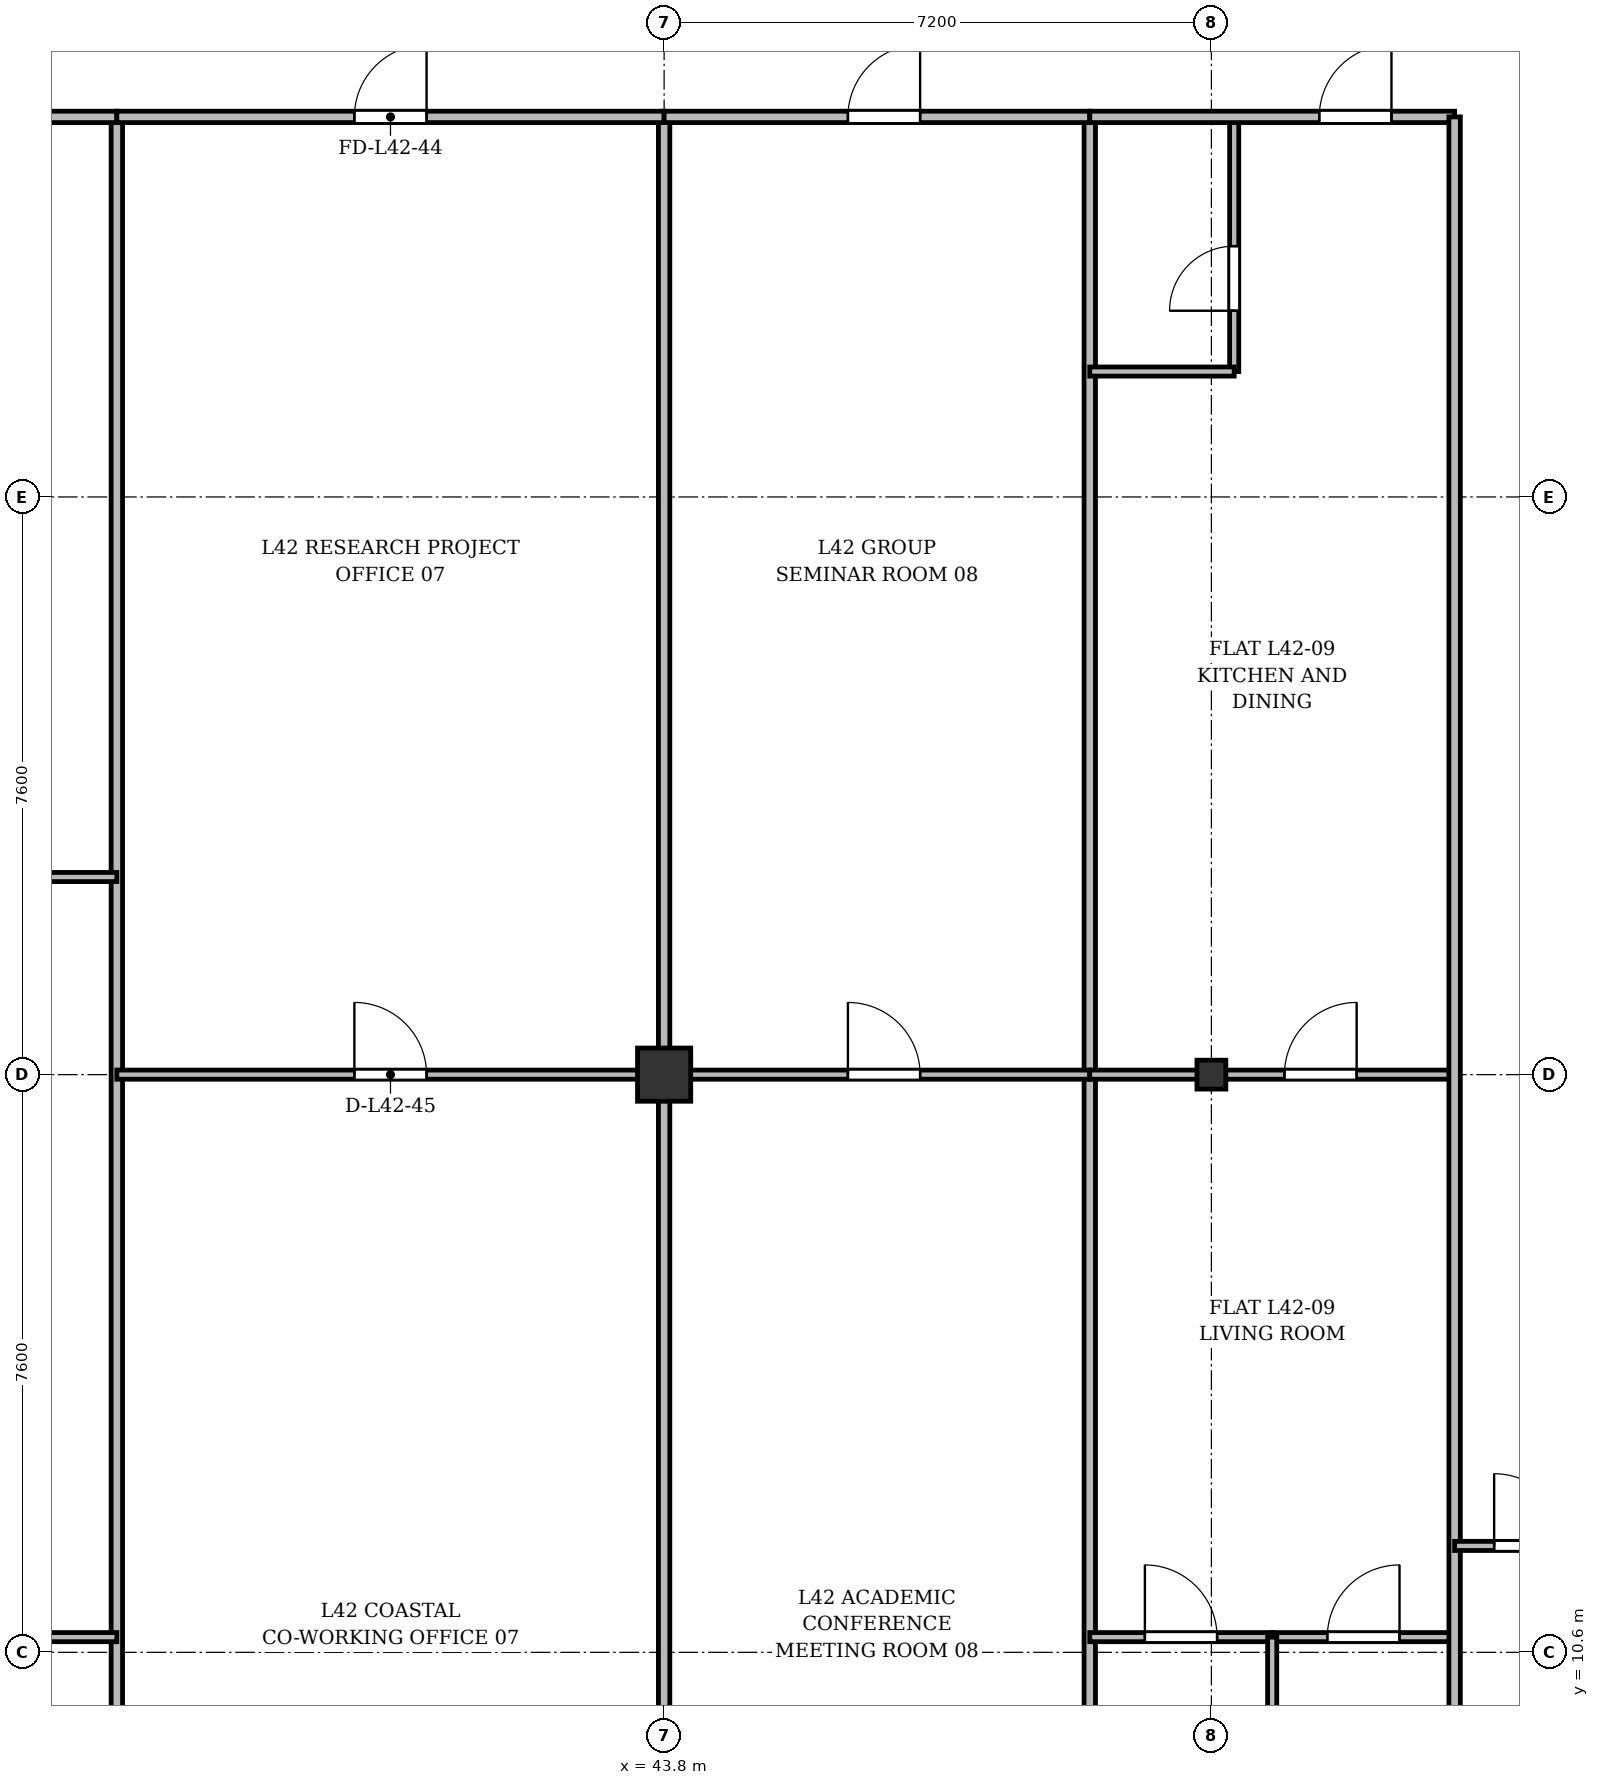
"""IFC4 building model, lengths in metres.
Left out: names, types, materials, properties, quantities, classifications, styles, units other than length and angle.
Written with IfcOpenShell. Run it as: python <this file> out.ifc"""

import sys

from ifc_helpers import new_model, si_unit, direction, frame, frame_2d, origin, origin_2d, place, context, subcontext, project, spatial, rectangle, i_section, extrude, source, transform, mapped, element, fill, save


model = new_model("IFC4")
c1 = context("Model", 3, precision=1e-05, world=origin(), true_north=direction((0.0, 1.0)))
c2 = subcontext(c1, "Body", "Model", "MODEL_VIEW")
j1 = project(units=[si_unit("LENGTHUNIT", "METRE"), si_unit("PLANEANGLEUNIT", "RADIAN")], contexts=[c1])
p1 = place(None, origin())
s1 = spatial("IfcSite", under=j1, at=p1, CompositionType="ELEMENT")
p2 = place(p1, origin())
s2 = spatial("IfcBuilding", under=s1, at=p2, CompositionType="ELEMENT")
p3 = place(p2, frame((0.0, 0.0, 160.9)))
s3 = spatial("IfcBuildingStorey", under=s2, at=p3, CompositionType="ELEMENT", Elevation=160.9)
m1 = source(origin(), c2, "Body", "SweptSolid", [
    extrude(rectangle(XDim=0.7, YDim=0.7, at=origin_2d()), origin(), (0.0, 0.0, 1.0), 3.6),
])
p4 = place(p3, frame((43.8, 18.2, 0.0), z_axis=(0.0, 0.0, 1.0), x_axis=(1.0, 0.0, 0.0)))
e1 = element("IfcColumn", 1, at=p4, inside=s3, PredefinedType="COLUMN", context=c2, shape_type="MappedRepresentation", body=[
    mapped(m1, transform((0.0, 0.0, 0.0), x_axis=(1.0, 0.0, 0.0), y_axis=(0.0, 1.0, 0.0), z_axis=(0.0, 0.0, 1.0), scale=1.0)),
])
m2 = source(origin(), c2, "Body", "SweptSolid", [
    extrude(i_section(OverallWidth=0.38, OverallDepth=0.38, WebThickness=0.02, FlangeThickness=0.03, at=origin_2d()), origin(), (0.0, 0.0, 1.0), 3.6),
])
p5 = place(p3, frame((51.0, 18.2, 0.0), z_axis=(0.0, 0.0, 1.0), x_axis=(1.0, 0.0, 0.0)))
e2 = element("IfcColumn", 2, at=p5, inside=s3, PredefinedType="COLUMN", context=c2, shape_type="MappedRepresentation", body=[
    mapped(m2, transform((0.0, 0.0, 0.0), x_axis=(1.0, 0.0, 0.0), y_axis=(0.0, 1.0, 0.0), z_axis=(0.0, 0.0, 1.0), scale=1.0)),
])
p6 = place(p3, frame((36.6, 3.525, 0.0), z_axis=(0.0, 0.0, 1.0), x_axis=(0.0, 1.0, 0.0)))
e3 = element("IfcWall", 3, at=p6, inside=s3, PredefinedType="PARTITIONING", context=c2, shape_type="SweptSolid", body=[
    extrude(rectangle(XDim=27.275, YDim=0.15, at=frame_2d((13.638, 0.0))), origin(), (0.0, 0.0, 1.0), 2.75),
])
p7 = place(p3, frame((43.8, 3.525, 0.0), z_axis=(0.0, 0.0, 1.0), x_axis=(0.0, 1.0, 0.0)))
e4 = element("IfcWall", 4, at=p7, inside=s3, PredefinedType="PARTITIONING", context=c2, shape_type="SweptSolid", body=[
    extrude(rectangle(XDim=27.275, YDim=0.15, at=frame_2d((13.638, 0.0))), origin(), (0.0, 0.0, 1.0), 2.85),
])
p8 = place(p3, frame((49.4, 3.525, 0.0), z_axis=(0.0, 0.0, 1.0), x_axis=(0.0, 1.0, 0.0)))
e5 = element("IfcWall", 5, at=p8, inside=s3, PredefinedType="PARTITIONING", context=c2, shape_type="SweptSolid", body=[
    extrude(rectangle(XDim=27.275, YDim=0.15, at=frame_2d((13.638, 0.0))), origin(), (0.0, 0.0, 1.0), 2.75),
])
p9 = place(p3, frame((30.6, 20.8, 0.0), z_axis=(0.0, 0.0, 1.0), x_axis=(1.0, 0.0, 0.0)))
e6 = element("IfcWall", 6, at=p9, inside=s3, PredefinedType="PARTITIONING", context=c2, shape_type="SweptSolid", body=[
    extrude(rectangle(XDim=6.0, YDim=0.12, at=frame_2d((3.0, 0.0))), origin(), (0.0, 0.0, 1.0), 2.85),
])
p10 = place(p9, frame((2.432, 0.0, 0.0)))
e7 = element("IfcOpeningElement", 7, at=p10, cuts=e6, PredefinedType="OPENING", context=c2, shape_type="SweptSolid", body=[
    extrude(rectangle(XDim=0.95, YDim=2.15, at=frame_2d((0.475, 1.075))), frame((0.0, 0.07, 0.0), z_axis=(0.0, -1.0, 0.0), x_axis=(1.0, 0.0, 0.0)), (0.0, 0.0, 1.0), 0.14),
])
p11 = place(p3, frame((30.6, 30.8, 0.0), z_axis=(0.0, 0.0, 1.0), x_axis=(1.0, 0.0, 0.0)))
e8 = element("IfcWall", 8, at=p11, inside=s3, PredefinedType="PARTITIONING", context=c2, shape_type="SweptSolid", body=[
    extrude(rectangle(XDim=6.0, YDim=0.15, at=frame_2d((3.0, 0.0))), origin(), (0.0, 0.0, 1.0), 2.85),
])
p12 = place(p11, frame((3.865, 0.0, 0.0)))
e9 = element("IfcOpeningElement", 9, at=p12, cuts=e8, PredefinedType="OPENING", context=c2, shape_type="SweptSolid", body=[
    extrude(rectangle(XDim=0.95, YDim=2.15, at=frame_2d((0.475, 1.075))), frame((0.0, 0.085, 0.0), z_axis=(0.0, -1.0, 0.0), x_axis=(1.0, 0.0, 0.0)), (0.0, 0.0, 1.0), 0.17),
])
p13 = place(p3, frame((33.6, 10.8, 0.0), z_axis=(0.0, 0.0, 1.0), x_axis=(1.0, 0.0, 0.0)))
e10 = element("IfcWall", 10, at=p13, inside=s3, PredefinedType="PARTITIONING", context=c2, shape_type="SweptSolid", body=[
    extrude(rectangle(XDim=3.0, YDim=0.12, at=frame_2d((1.5, 0.0))), origin(), (0.0, 0.0, 1.0), 3.35),
])
p14 = place(p13, frame((1.025, 0.0, 0.0)))
e11 = element("IfcOpeningElement", 11, at=p14, cuts=e10, PredefinedType="OPENING", context=c2, shape_type="SweptSolid", body=[
    extrude(rectangle(XDim=0.95, YDim=2.15, at=frame_2d((0.475, 1.075))), frame((0.0, 0.07, 0.0), z_axis=(0.0, -1.0, 0.0), x_axis=(1.0, 0.0, 0.0)), (0.0, 0.0, 1.0), 0.14),
])
p15 = place(p3, frame((36.6, 30.8, 0.0), z_axis=(0.0, 0.0, 1.0), x_axis=(1.0, 0.0, 0.0)))
e12 = element("IfcWall", 12, at=p15, inside=s3, PredefinedType="PARTITIONING", context=c2, shape_type="SweptSolid", body=[
    extrude(rectangle(XDim=7.2, YDim=0.15, at=frame_2d((3.6, 0.0))), origin(), (0.0, 0.0, 1.0), 2.85),
])
p16 = place(p15, frame((3.125, 0.0, 0.0)))
e13 = element("IfcOpeningElement", 13, at=p16, cuts=e12, PredefinedType="OPENING", context=c2, shape_type="SweptSolid", body=[
    extrude(rectangle(XDim=0.95, YDim=2.15, at=frame_2d((0.475, 1.075))), frame((0.0, 0.085, 0.0), z_axis=(0.0, -1.0, 0.0), x_axis=(1.0, 0.0, 0.0)), (0.0, 0.0, 1.0), 0.17),
])
p17 = place(p3, frame((36.6, 18.2, 0.0), z_axis=(0.0, 0.0, 1.0), x_axis=(1.0, 0.0, 0.0)))
e14 = element("IfcWall", 14, at=p17, inside=s3, PredefinedType="PARTITIONING", context=c2, shape_type="SweptSolid", body=[
    extrude(rectangle(XDim=7.2, YDim=0.12, at=frame_2d((3.6, 0.0))), origin(), (0.0, 0.0, 1.0), 2.75),
])
p18 = place(p17, frame((3.125, 0.0, 0.0)))
e15 = element("IfcOpeningElement", 15, at=p18, cuts=e14, PredefinedType="OPENING", context=c2, shape_type="SweptSolid", body=[
    extrude(rectangle(XDim=0.95, YDim=2.15, at=frame_2d((0.475, 1.075))), frame((0.0, 0.07, 0.0), z_axis=(0.0, -1.0, 0.0), x_axis=(1.0, 0.0, 0.0)), (0.0, 0.0, 1.0), 0.14),
])
p19 = place(p3, frame((43.8, 30.8, 0.0), z_axis=(0.0, 0.0, 1.0), x_axis=(1.0, 0.0, 0.0)))
e16 = element("IfcWall", 16, at=p19, inside=s3, PredefinedType="PARTITIONING", context=c2, shape_type="SweptSolid", body=[
    extrude(rectangle(XDim=5.6, YDim=0.15, at=frame_2d((2.8, 0.0))), origin(), (0.0, 0.0, 1.0), 2.85),
])
p20 = place(p19, frame((2.418, 0.0, 0.0)))
e17 = element("IfcOpeningElement", 17, at=p20, cuts=e16, PredefinedType="OPENING", context=c2, shape_type="SweptSolid", body=[
    extrude(rectangle(XDim=0.95, YDim=2.15, at=frame_2d((0.475, 1.075))), frame((0.0, 0.085, 0.0), z_axis=(0.0, -1.0, 0.0), x_axis=(1.0, 0.0, 0.0)), (0.0, 0.0, 1.0), 0.17),
])
p21 = place(p3, frame((43.8, 18.2, 0.0), z_axis=(0.0, 0.0, 1.0), x_axis=(1.0, 0.0, 0.0)))
e18 = element("IfcWall", 18, at=p21, inside=s3, PredefinedType="PARTITIONING", context=c2, shape_type="SweptSolid", body=[
    extrude(rectangle(XDim=5.6, YDim=0.12, at=frame_2d((2.8, 0.0))), origin(), (0.0, 0.0, 1.0), 2.75),
])
p22 = place(p21, frame((2.418, 0.0, 0.0)))
e19 = element("IfcOpeningElement", 19, at=p22, cuts=e18, PredefinedType="OPENING", context=c2, shape_type="SweptSolid", body=[
    extrude(rectangle(XDim=0.95, YDim=2.15, at=frame_2d((0.475, 1.075))), frame((0.0, 0.07, 0.0), z_axis=(0.0, -1.0, 0.0), x_axis=(1.0, 0.0, 0.0)), (0.0, 0.0, 1.0), 0.14),
])
p23 = place(p3, frame((49.4, 18.2, 0.0), z_axis=(0.0, 0.0, 1.0), x_axis=(1.0, 0.0, 0.0)))
e20 = element("IfcWall", 20, at=p23, inside=s3, PredefinedType="PARTITIONING", context=c2, shape_type="SweptSolid", body=[
    extrude(rectangle(XDim=4.8, YDim=0.12, at=frame_2d((2.4, 0.0))), origin(), (0.0, 0.0, 1.0), 2.75),
])
p24 = place(p23, frame((2.561, 0.0, 0.0)))
e21 = element("IfcOpeningElement", 21, at=p24, cuts=e20, PredefinedType="OPENING", context=c2, shape_type="SweptSolid", body=[
    extrude(rectangle(XDim=0.95, YDim=2.15, at=frame_2d((0.475, 1.075))), frame((0.0, 0.07, 0.0), z_axis=(0.0, -1.0, 0.0), x_axis=(1.0, 0.0, 0.0)), (0.0, 0.0, 1.0), 0.14),
])
p25 = place(p3, frame((51.3, 27.45, 0.0), z_axis=(0.0, 0.0, 1.0), x_axis=(0.0, 1.0, 0.0)))
e22 = element("IfcWall", 22, at=p25, inside=s3, PredefinedType="PARTITIONING", context=c2, shape_type="SweptSolid", body=[
    extrude(rectangle(XDim=3.35, YDim=0.12, at=frame_2d((1.675, 0.0))), origin(), (0.0, 0.0, 1.0), 3.35),
])
p26 = place(p25, frame((0.8, 0.0, 0.0)))
e23 = element("IfcOpeningElement", 23, at=p26, cuts=e22, PredefinedType="OPENING", context=c2, shape_type="SweptSolid", body=[
    extrude(rectangle(XDim=0.85, YDim=2.1, at=frame_2d((0.425, 1.05))), frame((0.0, 0.07, 0.0), z_axis=(0.0, -1.0, 0.0), x_axis=(1.0, 0.0, 0.0)), (0.0, 0.0, 1.0), 0.14),
])
p27 = place(p3, frame((49.4, 27.45, 0.0), z_axis=(0.0, 0.0, 1.0), x_axis=(1.0, 0.0, 0.0)))
e24 = element("IfcWall", 24, at=p27, inside=s3, PredefinedType="PARTITIONING", context=c2, shape_type="SweptSolid", body=[
    extrude(rectangle(XDim=1.9, YDim=0.12, at=frame_2d((0.95, 0.0))), origin(), (0.0, 0.0, 1.0), 2.85),
])
p28 = place(p3, frame((49.4, 30.8, 0.0), z_axis=(0.0, 0.0, 1.0), x_axis=(1.0, 0.0, 0.0)))
e25 = element("IfcWall", 25, at=p28, inside=s3, PredefinedType="PARTITIONING", context=c2, shape_type="SweptSolid", body=[
    extrude(rectangle(XDim=4.8, YDim=0.15, at=frame_2d((2.4, 0.0))), origin(), (0.0, 0.0, 1.0), 2.85),
])
p29 = place(p28, frame((3.019, 0.0, 0.0)))
e26 = element("IfcOpeningElement", 26, at=p29, cuts=e25, PredefinedType="OPENING", context=c2, shape_type="SweptSolid", body=[
    extrude(rectangle(XDim=0.95, YDim=2.15, at=frame_2d((0.475, 1.075))), frame((0.0, 0.085, 0.0), z_axis=(0.0, -1.0, 0.0), x_axis=(1.0, 0.0, 0.0)), (0.0, 0.0, 1.0), 0.17),
])
p30 = place(p3, frame((49.4, 10.8, 0.0), z_axis=(0.0, 0.0, 1.0), x_axis=(1.0, 0.0, 0.0)))
e27 = element("IfcWall", 27, at=p30, inside=s3, PredefinedType="PARTITIONING", context=c2, shape_type="SweptSolid", body=[
    extrude(rectangle(XDim=2.4, YDim=0.12, at=frame_2d((1.2, 0.0))), origin(), (0.0, 0.0, 1.0), 2.85),
])
p31 = place(p30, frame((0.725, 0.0, 0.0)))
e28 = element("IfcOpeningElement", 28, at=p31, cuts=e27, PredefinedType="OPENING", context=c2, shape_type="SweptSolid", body=[
    extrude(rectangle(XDim=0.95, YDim=2.15, at=frame_2d((0.475, 1.075))), frame((0.0, 0.07, 0.0), z_axis=(0.0, -1.0, 0.0), x_axis=(1.0, 0.0, 0.0)), (0.0, 0.0, 1.0), 0.14),
])
p32 = place(p3, frame((51.8, 10.8, 0.0), z_axis=(0.0, 0.0, 1.0), x_axis=(1.0, 0.0, 0.0)))
e29 = element("IfcWall", 29, at=p32, inside=s3, PredefinedType="PARTITIONING", context=c2, shape_type="SweptSolid", body=[
    extrude(rectangle(XDim=2.4, YDim=0.12, at=frame_2d((1.2, 0.0))), origin(), (0.0, 0.0, 1.0), 3.35),
])
p33 = place(p32, frame((0.725, 0.0, 0.0)))
e30 = element("IfcOpeningElement", 30, at=p33, cuts=e29, PredefinedType="OPENING", context=c2, shape_type="SweptSolid", body=[
    extrude(rectangle(XDim=0.95, YDim=2.15, at=frame_2d((0.475, 1.075))), frame((0.0, 0.07, 0.0), z_axis=(0.0, -1.0, 0.0), x_axis=(1.0, 0.0, 0.0)), (0.0, 0.0, 1.0), 0.14),
])
p34 = place(p3, frame((51.8, 3.525, 0.0), z_axis=(0.0, 0.0, 1.0), x_axis=(0.0, 1.0, 0.0)))
e31 = element("IfcWall", 31, at=p34, inside=s3, PredefinedType="PARTITIONING", context=c2, shape_type="SweptSolid", body=[
    extrude(rectangle(XDim=7.275, YDim=0.12, at=frame_2d((3.638, 0.0))), origin(), (0.0, 0.0, 1.0), 2.75),
])
p35 = place(p3, frame((54.2, 3.525, 0.0), z_axis=(0.0, 0.0, 1.0), x_axis=(0.0, 1.0, 0.0)))
e32 = element("IfcWall", 32, at=p35, inside=s3, PredefinedType="PARTITIONING", context=c2, shape_type="SweptSolid", body=[
    extrude(rectangle(XDim=27.275, YDim=0.15, at=frame_2d((13.638, 0.0))), origin(), (0.0, 0.0, 1.0), 2.75),
])
p36 = place(p3, frame((54.2, 12.0, 0.0), z_axis=(0.0, 0.0, 1.0), x_axis=(1.0, 0.0, 0.0)))
e33 = element("IfcWall", 33, at=p36, inside=s3, PredefinedType="PARTITIONING", context=c2, shape_type="SweptSolid", body=[
    extrude(rectangle(XDim=2.0, YDim=0.12, at=frame_2d((1.0, 0.0))), origin(), (0.0, 0.0, 1.0), 3.35),
])
p37 = place(p36, frame((0.52, 0.0, 0.0)))
e34 = element("IfcOpeningElement", 34, at=p37, cuts=e33, PredefinedType="OPENING", context=c2, shape_type="SweptSolid", body=[
    extrude(rectangle(XDim=0.95, YDim=2.15, at=frame_2d((0.475, 1.075))), frame((0.0, 0.07, 0.0), z_axis=(0.0, -1.0, 0.0), x_axis=(1.0, 0.0, 0.0)), (0.0, 0.0, 1.0), 0.14),
])
m3 = source(origin(), c2, "Body", "SweptSolid", [
    extrude(rectangle(XDim=0.95, YDim=2.15, at=frame_2d((0.475, 1.075))), frame((0.0, 0.025, 0.0), z_axis=(0.0, -1.0, 0.0), x_axis=(1.0, 0.0, 0.0)), (0.0, 0.0, 1.0), 0.05),
])
p38 = place(p16, origin())
e35 = element("IfcDoor", 35, at=p38, inside=s3, OperationType="SINGLE_SWING_RIGHT", PredefinedType="DOOR", context=c2, shape_type="MappedRepresentation", body=[
    mapped(m3, transform((0.0, 0.0, 0.0), x_axis=(1.0, 0.0, 0.0), y_axis=(0.0, 1.0, 0.0), z_axis=(0.0, 0.0, 1.0), scale=1.0)),
])
fill(e13, e35)
p39 = place(p18, origin())
e36 = element("IfcDoor", 36, at=p39, inside=s3, OperationType="SINGLE_SWING_LEFT", PredefinedType="DOOR", context=c2, shape_type="MappedRepresentation", body=[
    mapped(m3, transform((0.0, 0.0, 0.0), x_axis=(1.0, 0.0, 0.0), y_axis=(0.0, 1.0, 0.0), z_axis=(0.0, 0.0, 1.0), scale=1.0)),
])
fill(e15, e36)
p40 = place(p20, origin())
e37 = element("IfcDoor", 37, at=p40, inside=s3, OperationType="SINGLE_SWING_RIGHT", PredefinedType="DOOR", context=c2, shape_type="MappedRepresentation", body=[
    mapped(m3, transform((0.0, 0.0, 0.0), x_axis=(1.0, 0.0, 0.0), y_axis=(0.0, 1.0, 0.0), z_axis=(0.0, 0.0, 1.0), scale=1.0)),
])
fill(e17, e37)
p41 = place(p22, origin())
e38 = element("IfcDoor", 38, at=p41, inside=s3, OperationType="SINGLE_SWING_LEFT", PredefinedType="DOOR", context=c2, shape_type="MappedRepresentation", body=[
    mapped(m3, transform((0.0, 0.0, 0.0), x_axis=(1.0, 0.0, 0.0), y_axis=(0.0, 1.0, 0.0), z_axis=(0.0, 0.0, 1.0), scale=1.0)),
])
fill(e19, e38)
p42 = place(p24, origin())
e39 = element("IfcDoor", 39, at=p42, inside=s3, OperationType="SINGLE_SWING_RIGHT", PredefinedType="DOOR", context=c2, shape_type="MappedRepresentation", body=[
    mapped(m3, transform((0.0, 0.0, 0.0), x_axis=(1.0, 0.0, 0.0), y_axis=(0.0, 1.0, 0.0), z_axis=(0.0, 0.0, 1.0), scale=1.0)),
])
fill(e21, e39)
m4 = source(origin(), c2, "Body", "SweptSolid", [
    extrude(rectangle(XDim=0.85, YDim=2.1, at=frame_2d((0.425, 1.05))), frame((0.0, 0.025, 0.0), z_axis=(0.0, -1.0, 0.0), x_axis=(1.0, 0.0, 0.0)), (0.0, 0.0, 1.0), 0.05),
])
p43 = place(p26, origin())
e40 = element("IfcDoor", 40, at=p43, inside=s3, OperationType="SINGLE_SWING_LEFT", PredefinedType="DOOR", context=c2, shape_type="MappedRepresentation", body=[
    mapped(m4, transform((0.0, 0.0, 0.0), x_axis=(1.0, 0.0, 0.0), y_axis=(0.0, 1.0, 0.0), z_axis=(0.0, 0.0, 1.0), scale=1.0)),
])
fill(e23, e40)
p44 = place(p29, origin())
e41 = element("IfcDoor", 41, at=p44, inside=s3, OperationType="SINGLE_SWING_RIGHT", PredefinedType="DOOR", context=c2, shape_type="MappedRepresentation", body=[
    mapped(m3, transform((0.0, 0.0, 0.0), x_axis=(1.0, 0.0, 0.0), y_axis=(0.0, 1.0, 0.0), z_axis=(0.0, 0.0, 1.0), scale=1.0)),
])
fill(e26, e41)
p45 = place(p31, origin())
e42 = element("IfcDoor", 42, at=p45, inside=s3, OperationType="SINGLE_SWING_LEFT", PredefinedType="DOOR", context=c2, shape_type="MappedRepresentation", body=[
    mapped(m3, transform((0.0, 0.0, 0.0), x_axis=(1.0, 0.0, 0.0), y_axis=(0.0, 1.0, 0.0), z_axis=(0.0, 0.0, 1.0), scale=1.0)),
])
fill(e28, e42)
p46 = place(p33, origin())
e43 = element("IfcDoor", 43, at=p46, inside=s3, OperationType="SINGLE_SWING_RIGHT", PredefinedType="DOOR", context=c2, shape_type="MappedRepresentation", body=[
    mapped(m3, transform((0.0, 0.0, 0.0), x_axis=(1.0, 0.0, 0.0), y_axis=(0.0, 1.0, 0.0), z_axis=(0.0, 0.0, 1.0), scale=1.0)),
])
fill(e30, e43)
p47 = place(p37, origin())
e44 = element("IfcDoor", 44, at=p47, inside=s3, OperationType="SINGLE_SWING_LEFT", PredefinedType="DOOR", context=c2, shape_type="MappedRepresentation", body=[
    mapped(m3, transform((0.0, 0.0, 0.0), x_axis=(1.0, 0.0, 0.0), y_axis=(0.0, 1.0, 0.0), z_axis=(0.0, 0.0, 1.0), scale=1.0)),
])
fill(e34, e44)
save(model, sys.argv[1])
